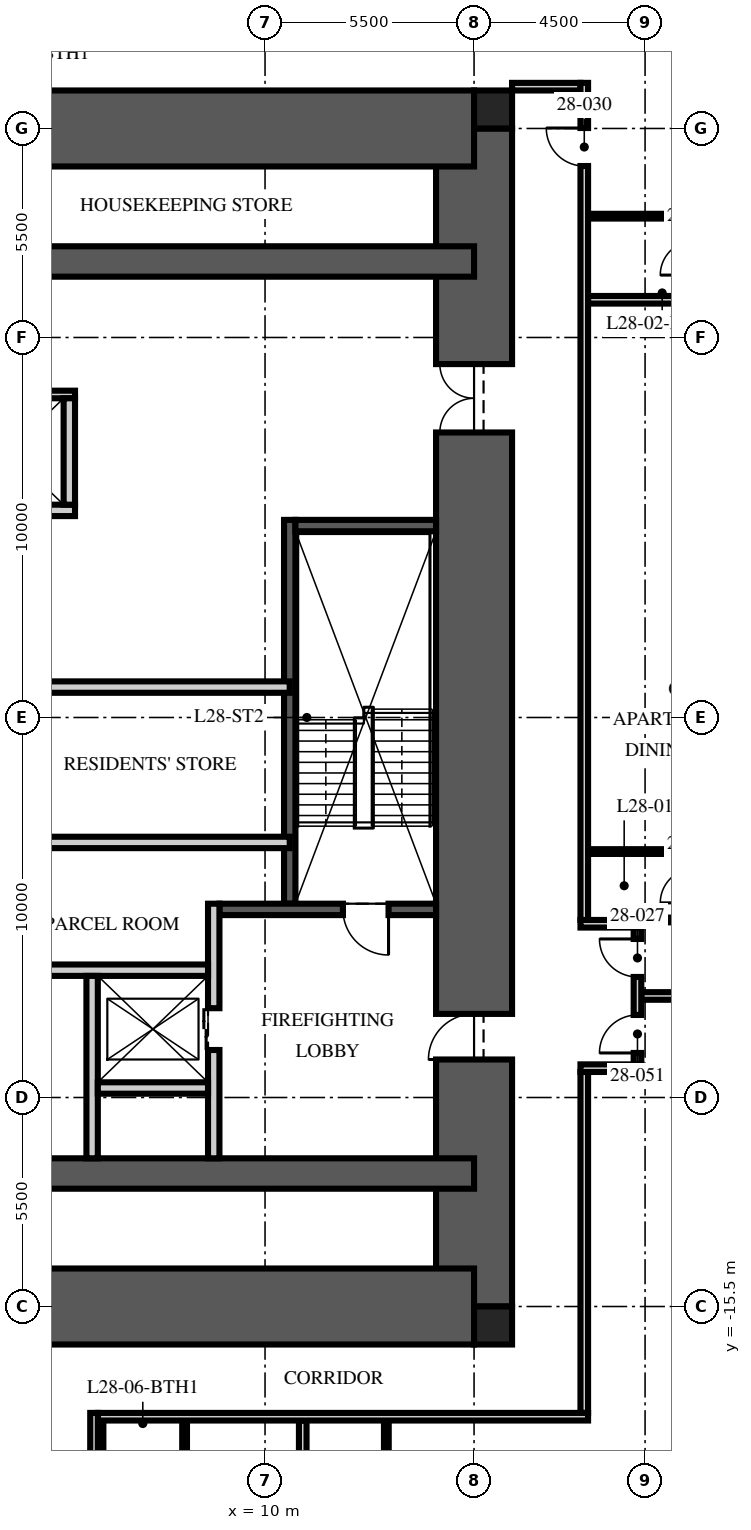
"""IFC4 building model, lengths in metres.
Left out: names, types, materials, properties, quantities, classifications, styles, units other than length and angle.
Written with IfcOpenShell. Run it as: python <this file> out.ifc"""

import sys

from ifc_helpers import new_model, si_unit, direction, frame, frame_2d, origin, origin_2d, place, context, subcontext, project, spatial, rectangle, extrude, element, fill, save


model = new_model("IFC4")
c1 = context("Model", 3, precision=1e-05, world=origin(), true_north=direction((0.0, 1.0)))
c2 = subcontext(c1, "Body", "Model", "MODEL_VIEW")
j1 = project(units=[si_unit("LENGTHUNIT", "METRE"), si_unit("PLANEANGLEUNIT", "RADIAN")], contexts=[c1])
p1 = place(None, origin())
s1 = spatial("IfcSite", under=j1, at=p1, CompositionType="ELEMENT")
p2 = place(p1, origin())
s2 = spatial("IfcBuilding", under=s1, at=p2, CompositionType="ELEMENT")
p3 = place(p2, frame((0.0, 0.0, 114.75)))
s3 = spatial("IfcBuildingStorey", under=s2, at=p3, CompositionType="ELEMENT", Elevation=114.75)
p4 = place(p3, frame((15.5, -15.5, -0.25), z_axis=(0.0, 0.0, 1.0), x_axis=(0.0, 1.0, 0.0)))
e1 = element("IfcWall", 1, at=p4, inside=s3, PredefinedType="SHEAR", context=c2, shape_type="SweptSolid", body=[
    extrude(rectangle(XDim=31.0, YDim=2.0, at=frame_2d((15.5, 0.0))), origin(), (0.0, 0.0, 1.0), 3.75),
])
p5 = place(p4, frame((6.5, 0.0, 0.25)))
e2 = element("IfcOpeningElement", 2, at=p5, cuts=e1, PredefinedType="OPENING", context=c2, shape_type="SweptSolid", body=[
    extrude(rectangle(XDim=1.2, YDim=2.1, at=frame_2d((0.6, 1.05))), frame((0.0, 1.01, 0.0), z_axis=(0.0, -1.0, 0.0), x_axis=(1.0, 0.0, 0.0)), (0.0, 0.0, 1.0), 2.02),
])
p6 = place(p4, frame((23.0, 0.0, 0.25)))
e3 = element("IfcOpeningElement", 3, at=p6, cuts=e1, PredefinedType="OPENING", context=c2, shape_type="SweptSolid", body=[
    extrude(rectangle(XDim=1.8, YDim=2.1, at=frame_2d((0.9, 1.05))), frame((0.0, 1.01, 0.0), z_axis=(0.0, -1.0, 0.0), x_axis=(1.0, 0.0, 0.0)), (0.0, 0.0, 1.0), 2.02),
])
p7 = place(p3, frame((-15.5, 15.5, -0.25), z_axis=(0.0, 0.0, 1.0), x_axis=(1.0, 0.0, 0.0)))
e4 = element("IfcWall", 4, at=p7, inside=s3, PredefinedType="SHEAR", context=c2, shape_type="SweptSolid", body=[
    extrude(rectangle(XDim=31.0, YDim=2.0, at=frame_2d((15.5, 0.0))), origin(), (0.0, 0.0, 1.0), 3.75),
])
p8 = place(p7, frame((5.0, 0.0, 0.25)))
e5 = element("IfcOpeningElement", 5, at=p8, cuts=e4, PredefinedType="OPENING", context=c2, shape_type="SweptSolid", body=[
    extrude(rectangle(XDim=1.0, YDim=2.1, at=frame_2d((0.5, 1.05))), frame((0.0, 1.01, 0.0), z_axis=(0.0, -1.0, 0.0), x_axis=(1.0, 0.0, 0.0)), (0.0, 0.0, 1.0), 2.02),
])
p9 = place(p3, frame((-15.5, -15.5, -0.25), z_axis=(0.0, 0.0, 1.0), x_axis=(1.0, 0.0, 0.0)))
e6 = element("IfcWall", 6, at=p9, inside=s3, PredefinedType="SHEAR", context=c2, shape_type="SweptSolid", body=[
    extrude(rectangle(XDim=31.0, YDim=2.0, at=frame_2d((15.5, 0.0))), origin(), (0.0, 0.0, 1.0), 3.75),
])
p10 = place(p9, frame((10.4, 0.0, 0.25)))
e7 = element("IfcOpeningElement", 7, at=p10, cuts=e6, PredefinedType="OPENING", context=c2, shape_type="SweptSolid", body=[
    extrude(rectangle(XDim=1.1, YDim=2.1, at=frame_2d((0.55, 1.05))), frame((0.0, 1.01, 0.0), z_axis=(0.0, -1.0, 0.0), x_axis=(1.0, 0.0, 0.0)), (0.0, 0.0, 1.0), 2.02),
])
p11 = place(p9, frame((13.5, 0.0, 0.25)))
e8 = element("IfcOpeningElement", 8, at=p11, cuts=e6, PredefinedType="OPENING", context=c2, shape_type="SweptSolid", body=[
    extrude(rectangle(XDim=1.1, YDim=2.1, at=frame_2d((0.55, 1.05))), frame((0.0, 1.01, 0.0), z_axis=(0.0, -1.0, 0.0), x_axis=(1.0, 0.0, 0.0)), (0.0, 0.0, 1.0), 2.02),
])
p12 = place(p9, frame((16.6, 0.0, 0.25)))
e9 = element("IfcOpeningElement", 9, at=p12, cuts=e6, PredefinedType="OPENING", context=c2, shape_type="SweptSolid", body=[
    extrude(rectangle(XDim=1.1, YDim=2.1, at=frame_2d((0.55, 1.05))), frame((0.0, 1.01, 0.0), z_axis=(0.0, -1.0, 0.0), x_axis=(1.0, 0.0, 0.0)), (0.0, 0.0, 1.0), 2.02),
])
for number, where, z_axis, x_axis in (
    (10, (-15.5, 12.0, -0.25), (0.0, 0.0, 1.0), (1.0, 0.0, 0.0)),
    (11, (-15.5, -12.0, -0.25), (0.0, 0.0, 1.0), (1.0, 0.0, 0.0)),
):
    element("IfcWall", number, at=place(p3, frame(where, z_axis=z_axis, x_axis=x_axis)), inside=s3, PredefinedType="SHEAR", context=c2, shape_type="SweptSolid", body=[
        extrude(rectangle(XDim=31.0, YDim=0.8, at=frame_2d((15.5, 0.0))), origin(), (0.0, 0.0, 1.0), 3.75),
    ])
for number, where, z_axis, x_axis in (
    (12, (16.0, 16.0, -0.25), (0.0, 0.0, 1.0), (1.0, 0.0, 0.0)),
    (13, (16.0, -16.0, -0.25), (0.0, 0.0, 1.0), (1.0, 0.0, 0.0)),
):
    element("IfcColumn", number, at=place(p3, frame(where, z_axis=z_axis, x_axis=x_axis)), inside=s3, PredefinedType="COLUMN", context=c2, shape_type="SweptSolid", body=[
        extrude(rectangle(XDim=1.0, YDim=1.0, at=origin_2d()), origin(), (0.0, 0.0, 1.0), 3.75),
    ])
p13 = place(p3, frame((10.65, -4.9, 0.0), z_axis=(0.0, 0.0, 1.0), x_axis=(0.0, 1.0, 0.0)))
e14 = element("IfcWall", 14, at=p13, inside=s3, PredefinedType="SOLIDWALL", context=c2, shape_type="SweptSolid", body=[
    extrude(rectangle(XDim=10.1, YDim=0.3, at=frame_2d((5.05, 0.0))), origin(), (0.0, 0.0, 1.0), 3.5),
])
p14 = place(p3, frame((14.5, -5.05, 0.0), z_axis=(0.0, 0.0, 1.0), x_axis=(-1.0, 0.0, 0.0)))
e15 = element("IfcWall", 15, at=p14, inside=s3, PredefinedType="SOLIDWALL", context=c2, shape_type="SweptSolid", body=[
    extrude(rectangle(XDim=5.7, YDim=0.3, at=frame_2d((2.85, 0.0))), origin(), (0.0, 0.0, 1.0), 3.5),
])
p15 = place(p14, frame((1.25, 0.0, 0.0)))
e16 = element("IfcOpeningElement", 16, at=p15, cuts=e15, PredefinedType="OPENING", context=c2, shape_type="SweptSolid", body=[
    extrude(rectangle(XDim=1.2, YDim=2.1, at=frame_2d((0.6, 1.05))), frame((0.0, 0.16, 0.0), z_axis=(0.0, -1.0, 0.0), x_axis=(1.0, 0.0, 0.0)), (0.0, 0.0, 1.0), 0.32),
])
p16 = place(p3, frame((14.5, 5.05, 0.0), z_axis=(0.0, 0.0, 1.0), x_axis=(-1.0, 0.0, 0.0)))
e17 = element("IfcWall", 17, at=p16, inside=s3, PredefinedType="SOLIDWALL", context=c2, shape_type="SweptSolid", body=[
    extrude(rectangle(XDim=3.7, YDim=0.3, at=frame_2d((1.85, 0.0))), origin(), (0.0, 0.0, 1.0), 3.5),
])
p17 = place(p3, frame((8.65, -11.6, 0.0), z_axis=(0.0, 0.0, 1.0), x_axis=(0.0, 1.0, 0.0)))
e18 = element("IfcWall", 18, at=p17, inside=s3, PredefinedType="PARTITIONING", context=c2, shape_type="SweptSolid", body=[
    extrude(rectangle(XDim=6.7, YDim=0.3, at=frame_2d((3.35, 0.0))), origin(), (0.0, 0.0, 1.0), 3.5),
])
p18 = place(p17, frame((2.85, 0.0, 0.0)))
e19 = element("IfcOpeningElement", 19, at=p18, cuts=e18, PredefinedType="OPENING", context=c2, shape_type="SweptSolid", body=[
    extrude(rectangle(XDim=1.1, YDim=2.1, at=frame_2d((0.55, 1.05))), frame((0.0, 0.16, 0.0), z_axis=(0.0, -1.0, 0.0), x_axis=(1.0, 0.0, 0.0)), (0.0, 0.0, 1.0), 0.32),
])
p19 = place(p3, frame((-8.5, -6.65, 0.0), z_axis=(0.0, 0.0, 1.0), x_axis=(1.0, 0.0, 0.0)))
e20 = element("IfcWall", 20, at=p19, inside=s3, PredefinedType="PARTITIONING", context=c2, shape_type="SweptSolid", body=[
    extrude(rectangle(XDim=17.0, YDim=0.3, at=frame_2d((8.5, 0.0))), origin(), (0.0, 0.0, 1.0), 3.5),
])
p20 = place(p19, frame((7.8, 0.0, 0.0)))
e21 = element("IfcOpeningElement", 21, at=p20, cuts=e20, PredefinedType="OPENING", context=c2, shape_type="SweptSolid", body=[
    extrude(rectangle(XDim=1.3, YDim=2.4, at=frame_2d((0.65, 1.2))), frame((0.0, 0.16, 0.0), z_axis=(0.0, -1.0, 0.0), x_axis=(1.0, 0.0, 0.0)), (0.0, 0.0, 1.0), 0.32),
])
p21 = place(p19, frame((5.65, 0.0, 0.0)))
e22 = element("IfcOpeningElement", 22, at=p21, cuts=e20, PredefinedType="OPENING", context=c2, shape_type="SweptSolid", body=[
    extrude(rectangle(XDim=0.9, YDim=2.1, at=frame_2d((0.45, 1.05))), frame((0.0, 0.16, 0.0), z_axis=(0.0, -1.0, 0.0), x_axis=(1.0, 0.0, 0.0)), (0.0, 0.0, 1.0), 0.32),
])
p22 = place(p19, frame((10.4, 0.0, 0.0)))
e23 = element("IfcOpeningElement", 23, at=p22, cuts=e20, PredefinedType="OPENING", context=c2, shape_type="SweptSolid", body=[
    extrude(rectangle(XDim=0.9, YDim=2.1, at=frame_2d((0.45, 1.05))), frame((0.0, 0.16, 0.0), z_axis=(0.0, -1.0, 0.0), x_axis=(1.0, 0.0, 0.0)), (0.0, 0.0, 1.0), 0.32),
])
p23 = place(p3, frame((5.45, -11.6, 0.0), z_axis=(0.0, 0.0, 1.0), x_axis=(0.0, 1.0, 0.0)))
e24 = element("IfcWall", 24, at=p23, inside=s3, PredefinedType="PARTITIONING", context=c2, shape_type="SweptSolid", body=[
    extrude(rectangle(XDim=4.8, YDim=0.3, at=frame_2d((2.4, 0.0))), origin(), (0.0, 0.0, 1.0), 3.5),
])
p24 = place(p3, frame((5.6, -9.75, 0.0), z_axis=(0.0, 0.0, 1.0), x_axis=(1.0, 0.0, 0.0)))
e25 = element("IfcWall", 25, at=p24, inside=s3, PredefinedType="PARTITIONING", context=c2, shape_type="SweptSolid", body=[
    extrude(rectangle(XDim=2.9, YDim=0.3, at=frame_2d((1.45, 0.0))), origin(), (0.0, 0.0, 1.0), 3.5),
])
p25 = place(p3, frame((-4.7, 5.45, 0.0), z_axis=(0.0, 0.0, 1.0), x_axis=(1.0, 0.0, 0.0)))
e26 = element("IfcWall", 26, at=p25, inside=s3, PredefinedType="PARTITIONING", context=c2, shape_type="SweptSolid", body=[
    extrude(rectangle(XDim=9.7, YDim=0.3, at=frame_2d((4.85, 0.0))), origin(), (0.0, 0.0, 1.0), 3.5),
])
p26 = place(p3, frame((-4.7, 8.5, 0.0), z_axis=(0.0, 0.0, 1.0), x_axis=(1.0, 0.0, 0.0)))
e27 = element("IfcWall", 27, at=p26, inside=s3, PredefinedType="PARTITIONING", context=c2, shape_type="SweptSolid", body=[
    extrude(rectangle(XDim=9.7, YDim=0.2, at=frame_2d((4.85, 0.0))), origin(), (0.0, 0.0, 1.0), 3.5),
])
p27 = place(p3, frame((4.85, 5.6, 0.0), z_axis=(0.0, 0.0, 1.0), x_axis=(0.0, 1.0, 0.0)))
e28 = element("IfcWall", 28, at=p27, inside=s3, PredefinedType="PARTITIONING", context=c2, shape_type="SweptSolid", body=[
    extrude(rectangle(XDim=2.8, YDim=0.3, at=frame_2d((1.4, 0.0))), origin(), (0.0, 0.0, 1.0), 3.5),
])
p28 = place(p3, frame((-10.65, 0.8, 0.0), z_axis=(0.0, 0.0, 1.0), x_axis=(1.0, 0.0, 0.0)))
e29 = element("IfcWall", 29, at=p28, inside=s3, PredefinedType="PARTITIONING", context=c2, shape_type="SweptSolid", body=[
    extrude(rectangle(XDim=21.3, YDim=0.3, at=frame_2d((10.65, 0.0))), origin(), (0.0, 0.0, 1.0), 3.5),
])
p29 = place(p28, frame((10.05, 0.0, 0.0)))
e30 = element("IfcOpeningElement", 30, at=p29, cuts=e29, PredefinedType="OPENING", context=c2, shape_type="SweptSolid", body=[
    extrude(rectangle(XDim=1.2, YDim=2.1, at=frame_2d((0.6, 1.05))), frame((0.0, 0.16, 0.0), z_axis=(0.0, -1.0, 0.0), x_axis=(1.0, 0.0, 0.0)), (0.0, 0.0, 1.0), 0.32),
])
p30 = place(p28, frame((1.74, 0.0, 0.0)))
e31 = element("IfcOpeningElement", 31, at=p30, cuts=e29, PredefinedType="OPENING", context=c2, shape_type="SweptSolid", body=[
    extrude(rectangle(XDim=0.9, YDim=2.1, at=frame_2d((0.45, 1.05))), frame((0.0, 0.16, 0.0), z_axis=(0.0, -1.0, 0.0), x_axis=(1.0, 0.0, 0.0)), (0.0, 0.0, 1.0), 0.32),
])
p31 = place(p3, frame((10.65, -3.288, 0.0), z_axis=(0.0, 0.0, 1.0), x_axis=(-1.0, 0.0, 0.0)))
e32 = element("IfcWall", 32, at=p31, inside=s3, PredefinedType="PARTITIONING", context=c2, shape_type="SweptSolid", body=[
    extrude(rectangle(XDim=7.35, YDim=0.3, at=frame_2d((3.675, 0.0))), origin(), (0.0, 0.0, 1.0), 3.5),
])
p32 = place(p3, frame((16.5, 16.6, 0.0), z_axis=(0.0, 0.0, 1.0), x_axis=(1.0, 0.0, 0.0)))
e33 = element("IfcWall", 33, at=p32, inside=s3, PredefinedType="PARTITIONING", context=c2, shape_type="SweptSolid", body=[
    extrude(rectangle(XDim=1.8, YDim=0.2, at=frame_2d((0.9, 0.0))), origin(), (0.0, 0.0, 1.0), 2.3),
])
p33 = place(p3, frame((19.9, -7.328, 0.0), z_axis=(0.0, 0.0, 1.0), x_axis=(1.0, 0.0, 0.0)))
e34 = element("IfcWall", 34, at=p33, inside=s3, PredefinedType="PARTITIONING", context=c2, shape_type="SweptSolid", body=[
    extrude(rectangle(XDim=9.25, YDim=0.2, at=frame_2d((4.625, 0.0))), origin(), (0.0, 0.0, 1.0), 2.81),
])
for number, where, z_axis, x_axis in (
    (35, (18.5, 10.992, 0.0), (0.0, 0.0, 1.0), (1.0, 0.0, 0.0)),
    (36, (10.992, -18.5, 0.0), (0.0, 0.0, 1.0), (0.0, -1.0, 0.0)),
):
    element("IfcWall", number, at=place(p3, frame(where, z_axis=z_axis, x_axis=x_axis)), inside=s3, PredefinedType="PARTITIONING", context=c2, shape_type="SweptSolid", body=[
        extrude(rectangle(XDim=10.65, YDim=0.2, at=frame_2d((5.325, 0.0))), origin(), (0.0, 0.0, 1.0), 2.81),
    ])
p34 = place(p3, frame((19.97, -5.328, 0.0), z_axis=(0.0, 0.0, 1.0), x_axis=(1.0, 0.0, 0.0)))
e37 = element("IfcWall", 37, at=p34, inside=s3, PredefinedType="PARTITIONING", context=c2, shape_type="SweptSolid", body=[
    extrude(rectangle(XDim=1.33, YDim=0.125, at=frame_2d((0.665, 0.0))), origin(), (0.0, 0.0, 1.0), 3.5),
])
for number, where, z_axis, x_axis in (
    (38, (18.5, -3.528, 0.0), (0.0, 0.0, 1.0), (1.0, 0.0, 0.0)),
    (39, (18.5, 13.192, 0.0), (0.0, 0.0, 1.0), (1.0, 0.0, 0.0)),
    (40, (5.684, -18.5, 0.0), (0.0, 0.0, 1.0), (0.0, -1.0, 0.0)),
    (41, (7.884, -18.5, 0.0), (0.0, 0.0, 1.0), (0.0, -1.0, 0.0)),
    (42, (13.192, -18.5, 0.0), (0.0, 0.0, 1.0), (0.0, -1.0, 0.0)),
):
    element("IfcWall", number, at=place(p3, frame(where, z_axis=z_axis, x_axis=x_axis)), inside=s3, PredefinedType="PARTITIONING", context=c2, shape_type="SweptSolid", body=[
        extrude(rectangle(XDim=2.8, YDim=0.125, at=frame_2d((1.4, 0.0))), origin(), (0.0, 0.0, 1.0), 3.5),
    ])
p35 = place(p3, frame((18.4, -18.3, 0.0), z_axis=(0.0, 0.0, 1.0), x_axis=(0.0, 1.0, 0.0)))
e43 = element("IfcWall", 43, at=p35, inside=s3, PredefinedType="PARTITIONING", context=c2, shape_type="SweptSolid", body=[
    extrude(rectangle(XDim=8.972, YDim=0.2, at=frame_2d((4.486, 0.0))), origin(), (0.0, 0.0, 1.0), 2.3),
])
p36 = place(p3, frame((18.3, -9.228, 0.0), z_axis=(0.0, 0.0, 1.0), x_axis=(1.0, 0.0, 0.0)))
e44 = element("IfcWall", 44, at=p36, inside=s3, PredefinedType="PARTITIONING", context=c2, shape_type="SweptSolid", body=[
    extrude(rectangle(XDim=1.6, YDim=0.2, at=frame_2d((0.8, 0.0))), origin(), (0.0, 0.0, 1.0), 2.7),
])
p37 = place(p3, frame((18.3, -5.428, 0.0), z_axis=(0.0, 0.0, 1.0), x_axis=(1.0, 0.0, 0.0)))
e45 = element("IfcWall", 45, at=p37, inside=s3, PredefinedType="PARTITIONING", context=c2, shape_type="SweptSolid", body=[
    extrude(rectangle(XDim=1.6, YDim=0.2, at=frame_2d((0.8, 0.0))), origin(), (0.0, 0.0, 1.0), 3.5),
])
p38 = place(p3, frame((19.8, -9.128, 0.0), z_axis=(0.0, 0.0, 1.0), x_axis=(0.0, 1.0, 0.0)))
e46 = element("IfcWall", 46, at=p38, inside=s3, PredefinedType="PARTITIONING", context=c2, shape_type="SweptSolid", body=[
    extrude(rectangle(XDim=3.6, YDim=0.2, at=frame_2d((1.8, 0.0))), origin(), (0.0, 0.0, 1.0), 2.7),
])
p39 = place(p38, frame((2.3, 0.0, 0.0)))
e47 = element("IfcOpeningElement", 47, at=p39, cuts=e46, PredefinedType="OPENING", context=c2, shape_type="SweptSolid", body=[
    extrude(rectangle(XDim=1.0, YDim=2.2, at=frame_2d((0.5, 1.1))), frame((0.0, 0.11, 0.0), z_axis=(0.0, -1.0, 0.0), x_axis=(1.0, 0.0, 0.0)), (0.0, 0.0, 1.0), 0.22),
])
p40 = place(p38, frame((0.3, 0.0, 0.0)))
e48 = element("IfcOpeningElement", 48, at=p40, cuts=e46, PredefinedType="OPENING", context=c2, shape_type="SweptSolid", body=[
    extrude(rectangle(XDim=1.0, YDim=2.2, at=frame_2d((0.5, 1.1))), frame((0.0, 0.11, 0.0), z_axis=(0.0, -1.0, 0.0), x_axis=(1.0, 0.0, 0.0)), (0.0, 0.0, 1.0), 0.22),
])
p41 = place(p3, frame((18.4, -5.328, 0.0), z_axis=(0.0, 0.0, 1.0), x_axis=(0.0, 1.0, 0.0)))
e49 = element("IfcWall", 49, at=p41, inside=s3, PredefinedType="PARTITIONING", context=c2, shape_type="SweptSolid", body=[
    extrude(rectangle(XDim=22.028, YDim=0.2, at=frame_2d((11.014, 0.0))), origin(), (0.0, 0.0, 1.0), 2.7),
])
p42 = place(p41, frame((19.84, 0.0, 0.0)))
e50 = element("IfcOpeningElement", 50, at=p42, cuts=e49, PredefinedType="OPENING", context=c2, shape_type="SweptSolid", body=[
    extrude(rectangle(XDim=1.0, YDim=2.2, at=frame_2d((0.5, 1.1))), frame((0.0, 0.11, 0.0), z_axis=(0.0, -1.0, 0.0), x_axis=(1.0, 0.0, 0.0)), (0.0, 0.0, 1.0), 0.22),
])
p43 = place(p3, frame((18.5, -18.4, 0.0), z_axis=(0.0, 0.0, 1.0), x_axis=(-1.0, 0.0, 0.0)))
e51 = element("IfcWall", 51, at=p43, inside=s3, PredefinedType="PARTITIONING", context=c2, shape_type="SweptSolid", body=[
    extrude(rectangle(XDim=12.9, YDim=0.2, at=frame_2d((6.45, 0.0))), origin(), (0.0, 0.0, 1.0), 2.3),
])
p44 = place(p3, frame((5.5, -18.3, 0.0), z_axis=(0.0, 0.0, 1.0), x_axis=(0.0, -1.0, 0.0)))
e52 = element("IfcWall", 52, at=p44, inside=s3, PredefinedType="PARTITIONING", context=c2, shape_type="SweptSolid", body=[
    extrude(rectangle(XDim=3.0, YDim=0.2, at=frame_2d((1.5, 0.0))), origin(), (0.0, 0.0, 1.0), 3.5),
])
p45 = place(p15, origin())
e53 = element("IfcDoor", 53, at=p45, inside=s3, OperationType="SINGLE_SWING_LEFT", PredefinedType="DOOR", context=c2, shape_type="SweptSolid", body=[
    extrude(rectangle(XDim=1.2, YDim=2.1, at=frame_2d((0.6, 1.05))), frame((0.0, 0.025, 0.0), z_axis=(0.0, -1.0, 0.0), x_axis=(1.0, 0.0, 0.0)), (0.0, 0.0, 1.0), 0.05),
])
fill(e16, e53)
p46 = place(p5, origin())
e54 = element("IfcDoor", 54, at=p46, inside=s3, OperationType="SINGLE_SWING_LEFT", PredefinedType="DOOR", context=c2, shape_type="SweptSolid", body=[
    extrude(rectangle(XDim=1.2, YDim=2.1, at=frame_2d((0.6, 1.05))), frame((0.0, 0.025, 0.0), z_axis=(0.0, -1.0, 0.0), x_axis=(1.0, 0.0, 0.0)), (0.0, 0.0, 1.0), 0.05),
])
fill(e2, e54)
p47 = place(p6, origin())
e55 = element("IfcDoor", 55, at=p47, inside=s3, OperationType="DOUBLE_DOOR_SINGLE_SWING", PredefinedType="DOOR", context=c2, shape_type="SweptSolid", body=[
    extrude(rectangle(XDim=1.8, YDim=2.1, at=frame_2d((0.9, 1.05))), frame((0.0, 0.025, 0.0), z_axis=(0.0, -1.0, 0.0), x_axis=(1.0, 0.0, 0.0)), (0.0, 0.0, 1.0), 0.05),
])
fill(e3, e55)
p48 = place(p18, origin())
e56 = element("IfcDoor", 56, at=p48, inside=s3, OperationType="DOUBLE_DOOR_SLIDING", PredefinedType="DOOR", context=c2, shape_type="SweptSolid", body=[
    extrude(rectangle(XDim=1.1, YDim=2.1, at=frame_2d((0.55, 1.05))), frame((0.0, 0.025, 0.0), z_axis=(0.0, -1.0, 0.0), x_axis=(1.0, 0.0, 0.0)), (0.0, 0.0, 1.0), 0.05),
])
fill(e19, e56)
p49 = place(p39, origin())
e57 = element("IfcDoor", 57, at=p49, inside=s3, OperationType="SINGLE_SWING_RIGHT", PredefinedType="DOOR", context=c2, shape_type="SweptSolid", body=[
    extrude(rectangle(XDim=1.0, YDim=2.2, at=frame_2d((0.5, 1.1))), frame((0.0, 0.025, 0.0), z_axis=(0.0, -1.0, 0.0), x_axis=(1.0, 0.0, 0.0)), (0.0, 0.0, 1.0), 0.05),
])
fill(e47, e57)
p50 = place(p42, origin())
e58 = element("IfcDoor", 58, at=p50, inside=s3, OperationType="SINGLE_SWING_RIGHT", PredefinedType="DOOR", context=c2, shape_type="SweptSolid", body=[
    extrude(rectangle(XDim=1.0, YDim=2.2, at=frame_2d((0.5, 1.1))), frame((0.0, 0.025, 0.0), z_axis=(0.0, -1.0, 0.0), x_axis=(1.0, 0.0, 0.0)), (0.0, 0.0, 1.0), 0.05),
])
fill(e50, e58)
p51 = place(p40, origin())
e59 = element("IfcDoor", 59, at=p51, inside=s3, OperationType="SINGLE_SWING_LEFT", PredefinedType="DOOR", context=c2, shape_type="SweptSolid", body=[
    extrude(rectangle(XDim=1.0, YDim=2.2, at=frame_2d((0.5, 1.1))), frame((0.0, 0.025, 0.0), z_axis=(0.0, -1.0, 0.0), x_axis=(1.0, 0.0, 0.0)), (0.0, 0.0, 1.0), 0.05),
])
fill(e48, e59)
save(model, sys.argv[1])
